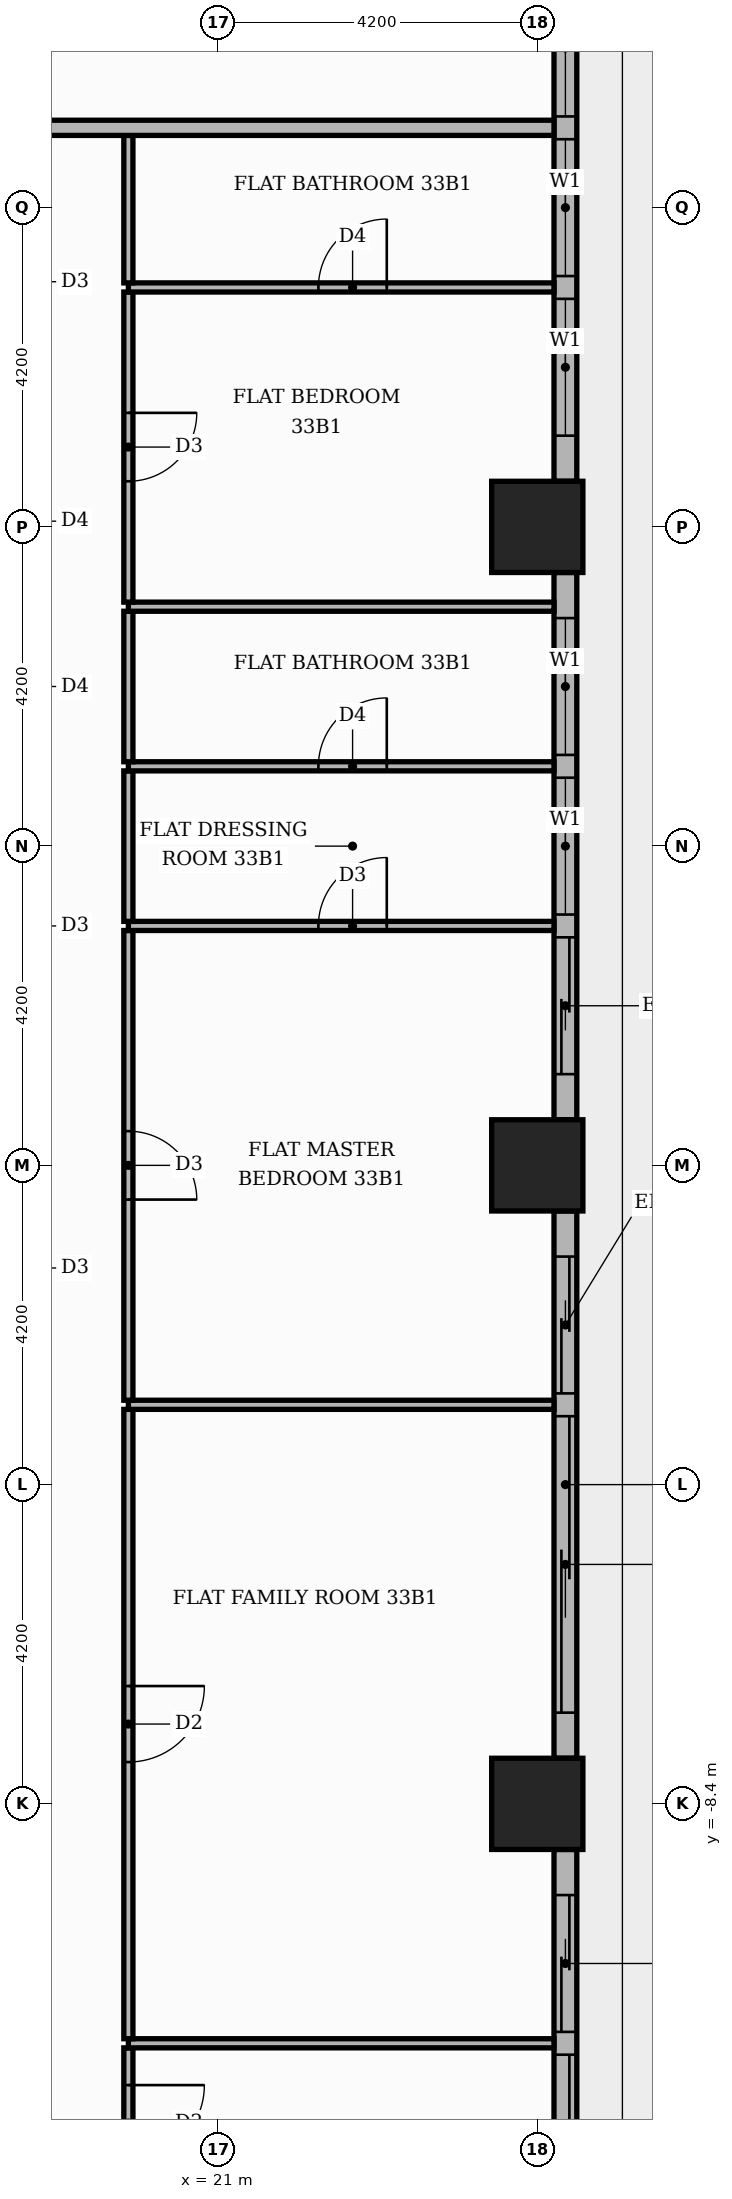
"""IFC4 building model, lengths in metres.
Left out: names, types, materials, properties, quantities, classifications, styles, units other than length and angle.
Written with IfcOpenShell. Run it as: python <this file> out.ifc"""

import sys

from ifc_helpers import new_model, si_unit, direction, frame, frame_2d, origin, origin_2d, place, context, subcontext, project, spatial, rectangle, extrude, element, fill, save


model = new_model("IFC4")
c1 = context("Model", 3, precision=1e-05, world=origin(), true_north=direction((0.0, 1.0)))
c2 = subcontext(c1, "Body", "Model", "MODEL_VIEW")
j1 = project(units=[si_unit("LENGTHUNIT", "METRE"), si_unit("PLANEANGLEUNIT", "RADIAN")], contexts=[c1])
p1 = place(None, origin())
s1 = spatial("IfcSite", under=j1, at=p1, CompositionType="ELEMENT")
p2 = place(p1, origin())
s2 = spatial("IfcBuilding", under=s1, at=p2, CompositionType="ELEMENT")
p3 = place(p2, frame((0.0, 0.0, 141.6)))
s3 = spatial("IfcBuildingStorey", under=s2, at=p3, CompositionType="ELEMENT", Elevation=141.6)
for number, where, z_axis, x_axis in (
    (1, (25.2, 0.0, 0.0), (0.0, 0.0, 1.0), (1.0, 0.0, 0.0)),
    (2, (25.2, 8.4, 0.0), (0.0, 0.0, 1.0), (1.0, 0.0, 0.0)),
    (3, (25.2, -8.4, 0.0), (0.0, 0.0, 1.0), (1.0, 0.0, 0.0)),
):
    element("IfcColumn", number, at=place(p3, frame(where, z_axis=z_axis, x_axis=x_axis)), inside=s3, PredefinedType="COLUMN", context=c2, shape_type="SweptSolid", body=[
        extrude(rectangle(XDim=1.2, YDim=1.2, at=origin_2d()), origin(), (0.0, 0.0, 1.0), 3.9),
    ])
p4 = place(p3, frame((25.57, -16.2, 0.0), z_axis=(0.0, 0.0, 1.0), x_axis=(0.0, 1.0, 0.0)))
e4 = element("IfcWall", 4, at=p4, inside=s3, PredefinedType="STANDARD", context=c2, shape_type="SweptSolid", body=[
    extrude(rectangle(XDim=7.2, YDim=0.3, at=frame_2d((3.6, 0.0))), origin(), (0.0, 0.0, 1.0), 3.48),
])
p5 = place(p4, frame((0.6, 0.0, 0.0)))
e5 = element("IfcOpeningElement", 5, at=p5, cuts=e4, PredefinedType="OPENING", context=c2, shape_type="SweptSolid", body=[
    extrude(rectangle(XDim=3.9, YDim=2.4, at=frame_2d((1.95, 1.2))), frame((0.0, 0.16, 0.0), z_axis=(0.0, -1.0, 0.0), x_axis=(1.0, 0.0, 0.0)), (0.0, 0.0, 1.0), 0.32),
])
p6 = place(p4, frame((4.8, 0.0, 0.0)))
e6 = element("IfcOpeningElement", 6, at=p6, cuts=e4, PredefinedType="OPENING", context=c2, shape_type="SweptSolid", body=[
    extrude(rectangle(XDim=1.8, YDim=2.4, at=frame_2d((0.9, 1.2))), frame((0.0, 0.16, 0.0), z_axis=(0.0, -1.0, 0.0), x_axis=(1.0, 0.0, 0.0)), (0.0, 0.0, 1.0), 0.32),
])
p7 = place(p3, frame((25.57, -7.8, 0.0), z_axis=(0.0, 0.0, 1.0), x_axis=(0.0, 1.0, 0.0)))
e7 = element("IfcWall", 7, at=p7, inside=s3, PredefinedType="STANDARD", context=c2, shape_type="SweptSolid", body=[
    extrude(rectangle(XDim=7.2, YDim=0.3, at=frame_2d((3.6, 0.0))), origin(), (0.0, 0.0, 1.0), 3.48),
])
p8 = place(p7, frame((0.6, 0.0, 0.0)))
e8 = element("IfcOpeningElement", 8, at=p8, cuts=e7, PredefinedType="OPENING", context=c2, shape_type="SweptSolid", body=[
    extrude(rectangle(XDim=3.9, YDim=2.4, at=frame_2d((1.95, 1.2))), frame((0.0, 0.16, 0.0), z_axis=(0.0, -1.0, 0.0), x_axis=(1.0, 0.0, 0.0)), (0.0, 0.0, 1.0), 0.32),
])
p9 = place(p7, frame((4.8, 0.0, 0.0)))
e9 = element("IfcOpeningElement", 9, at=p9, cuts=e7, PredefinedType="OPENING", context=c2, shape_type="SweptSolid", body=[
    extrude(rectangle(XDim=1.8, YDim=2.4, at=frame_2d((0.9, 1.2))), frame((0.0, 0.16, 0.0), z_axis=(0.0, -1.0, 0.0), x_axis=(1.0, 0.0, 0.0)), (0.0, 0.0, 1.0), 0.32),
])
p10 = place(p3, frame((25.57, 0.6, 0.0), z_axis=(0.0, 0.0, 1.0), x_axis=(0.0, 1.0, 0.0)))
e10 = element("IfcWall", 10, at=p10, inside=s3, PredefinedType="STANDARD", context=c2, shape_type="SweptSolid", body=[
    extrude(rectangle(XDim=7.2, YDim=0.3, at=frame_2d((3.6, 0.0))), origin(), (0.0, 0.0, 1.0), 3.48),
])
p11 = place(p10, frame((0.6, 0.0, 0.0)))
e11 = element("IfcOpeningElement", 11, at=p11, cuts=e10, PredefinedType="OPENING", context=c2, shape_type="SweptSolid", body=[
    extrude(rectangle(XDim=1.8, YDim=2.4, at=frame_2d((0.9, 1.2))), frame((0.0, 0.16, 0.0), z_axis=(0.0, -1.0, 0.0), x_axis=(1.0, 0.0, 0.0)), (0.0, 0.0, 1.0), 0.32),
])
p12 = place(p10, frame((2.7, 0.0, 0.9)))
e12 = element("IfcOpeningElement", 12, at=p12, cuts=e10, PredefinedType="OPENING", context=c2, shape_type="SweptSolid", body=[
    extrude(rectangle(XDim=1.8, YDim=2.1, at=frame_2d((0.9, 1.05))), frame((0.0, 0.16, 0.0), z_axis=(0.0, -1.0, 0.0), x_axis=(1.0, 0.0, 0.0)), (0.0, 0.0, 1.0), 0.32),
])
p13 = place(p10, frame((4.8, 0.0, 0.9)))
e13 = element("IfcOpeningElement", 13, at=p13, cuts=e10, PredefinedType="OPENING", context=c2, shape_type="SweptSolid", body=[
    extrude(rectangle(XDim=1.8, YDim=2.1, at=frame_2d((0.9, 1.05))), frame((0.0, 0.16, 0.0), z_axis=(0.0, -1.0, 0.0), x_axis=(1.0, 0.0, 0.0)), (0.0, 0.0, 1.0), 0.32),
])
p14 = place(p3, frame((25.57, 9.0, 0.0), z_axis=(0.0, 0.0, 1.0), x_axis=(0.0, 1.0, 0.0)))
e14 = element("IfcWall", 14, at=p14, inside=s3, PredefinedType="STANDARD", context=c2, shape_type="SweptSolid", body=[
    extrude(rectangle(XDim=7.2, YDim=0.3, at=frame_2d((3.6, 0.0))), origin(), (0.0, 0.0, 1.0), 3.48),
])
p15 = place(p14, frame((0.6, 0.0, 0.9)))
e15 = element("IfcOpeningElement", 15, at=p15, cuts=e14, PredefinedType="OPENING", context=c2, shape_type="SweptSolid", body=[
    extrude(rectangle(XDim=1.8, YDim=2.1, at=frame_2d((0.9, 1.05))), frame((0.0, 0.16, 0.0), z_axis=(0.0, -1.0, 0.0), x_axis=(1.0, 0.0, 0.0)), (0.0, 0.0, 1.0), 0.32),
])
p16 = place(p14, frame((2.7, 0.0, 0.9)))
e16 = element("IfcOpeningElement", 16, at=p16, cuts=e14, PredefinedType="OPENING", context=c2, shape_type="SweptSolid", body=[
    extrude(rectangle(XDim=1.8, YDim=2.1, at=frame_2d((0.9, 1.05))), frame((0.0, 0.16, 0.0), z_axis=(0.0, -1.0, 0.0), x_axis=(1.0, 0.0, 0.0)), (0.0, 0.0, 1.0), 0.32),
])
p17 = place(p14, frame((4.8, 0.0, 0.9)))
e17 = element("IfcOpeningElement", 17, at=p17, cuts=e14, PredefinedType="OPENING", context=c2, shape_type="SweptSolid", body=[
    extrude(rectangle(XDim=1.8, YDim=2.1, at=frame_2d((0.9, 1.05))), frame((0.0, 0.16, 0.0), z_axis=(0.0, -1.0, 0.0), x_axis=(1.0, 0.0, 0.0)), (0.0, 0.0, 1.0), 0.32),
])
p18 = place(p3, frame((19.82, -13.59, 0.0), z_axis=(0.0, 0.0, 1.0), x_axis=(0.0, 1.0, 0.0)))
e18 = element("IfcWall", 18, at=p18, inside=s3, PredefinedType="PARTITIONING", context=c2, shape_type="SweptSolid", body=[
    extrude(rectangle(XDim=1.98, YDim=0.12, at=frame_2d((0.99, 0.0))), origin(), (0.0, 0.0, 1.0), 3.48),
])
p19 = place(p18, frame((0.49, 0.0, 0.0)))
e19 = element("IfcOpeningElement", 19, at=p19, cuts=e18, PredefinedType="OPENING", context=c2, shape_type="SweptSolid", body=[
    extrude(rectangle(XDim=1.0, YDim=2.1, at=frame_2d((0.5, 1.05))), frame((0.0, 0.07, 0.0), z_axis=(0.0, -1.0, 0.0), x_axis=(1.0, 0.0, 0.0)), (0.0, 0.0, 1.0), 0.14),
])
p20 = place(p3, frame((19.82, -11.55, 0.0), z_axis=(0.0, 0.0, 1.0), x_axis=(1.0, 0.0, 0.0)))
e20 = element("IfcWall", 20, at=p20, inside=s3, PredefinedType="PARTITIONING", context=c2, shape_type="SweptSolid", body=[
    extrude(rectangle(XDim=5.6, YDim=0.12, at=frame_2d((2.8, 0.0))), origin(), (0.0, 0.0, 1.0), 3.48),
])
p21 = place(p3, frame((19.82, -11.49, 0.0), z_axis=(0.0, 0.0, 1.0), x_axis=(0.0, 1.0, 0.0)))
e21 = element("IfcWall", 21, at=p21, inside=s3, PredefinedType="PARTITIONING", context=c2, shape_type="SweptSolid", body=[
    extrude(rectangle(XDim=8.28, YDim=0.12, at=frame_2d((4.14, 0.0))), origin(), (0.0, 0.0, 1.0), 3.48),
])
p22 = place(p21, frame((3.64, 0.0, 0.0)))
e22 = element("IfcOpeningElement", 22, at=p22, cuts=e21, PredefinedType="OPENING", context=c2, shape_type="SweptSolid", body=[
    extrude(rectangle(XDim=1.0, YDim=2.1, at=frame_2d((0.5, 1.05))), frame((0.0, 0.07, 0.0), z_axis=(0.0, -1.0, 0.0), x_axis=(1.0, 0.0, 0.0)), (0.0, 0.0, 1.0), 0.14),
])
p23 = place(p3, frame((19.82, -3.15, 0.0), z_axis=(0.0, 0.0, 1.0), x_axis=(1.0, 0.0, 0.0)))
e23 = element("IfcWall", 23, at=p23, inside=s3, PredefinedType="PARTITIONING", context=c2, shape_type="SweptSolid", body=[
    extrude(rectangle(XDim=5.6, YDim=0.12, at=frame_2d((2.8, 0.0))), origin(), (0.0, 0.0, 1.0), 3.48),
])
p24 = place(p3, frame((19.82, -3.09, 0.0), z_axis=(0.0, 0.0, 1.0), x_axis=(0.0, 1.0, 0.0)))
e24 = element("IfcWall", 24, at=p24, inside=s3, PredefinedType="PARTITIONING", context=c2, shape_type="SweptSolid", body=[
    extrude(rectangle(XDim=6.18, YDim=0.12, at=frame_2d((3.09, 0.0))), origin(), (0.0, 0.0, 1.0), 3.48),
])
p25 = place(p24, frame((2.64, 0.0, 0.0)))
e25 = element("IfcOpeningElement", 25, at=p25, cuts=e24, PredefinedType="OPENING", context=c2, shape_type="SweptSolid", body=[
    extrude(rectangle(XDim=0.9, YDim=2.1, at=frame_2d((0.45, 1.05))), frame((0.0, 0.07, 0.0), z_axis=(0.0, -1.0, 0.0), x_axis=(1.0, 0.0, 0.0)), (0.0, 0.0, 1.0), 0.14),
])
p26 = place(p3, frame((19.82, 3.15, 0.0), z_axis=(0.0, 0.0, 1.0), x_axis=(1.0, 0.0, 0.0)))
e26 = element("IfcWall", 26, at=p26, inside=s3, PredefinedType="PARTITIONING", context=c2, shape_type="SweptSolid", body=[
    extrude(rectangle(XDim=5.6, YDim=0.12, at=frame_2d((2.8, 0.0))), origin(), (0.0, 0.0, 1.0), 3.48),
])
p27 = place(p26, frame((2.5, 0.0, 0.0)))
e27 = element("IfcOpeningElement", 27, at=p27, cuts=e26, PredefinedType="OPENING", context=c2, shape_type="SweptSolid", body=[
    extrude(rectangle(XDim=0.9, YDim=2.1, at=frame_2d((0.45, 1.05))), frame((0.0, 0.07, 0.0), z_axis=(0.0, -1.0, 0.0), x_axis=(1.0, 0.0, 0.0)), (0.0, 0.0, 1.0), 0.14),
])
p28 = place(p3, frame((19.82, 3.21, 0.0), z_axis=(0.0, 0.0, 1.0), x_axis=(0.0, 1.0, 0.0)))
e28 = element("IfcWall", 28, at=p28, inside=s3, PredefinedType="PARTITIONING", context=c2, shape_type="SweptSolid", body=[
    extrude(rectangle(XDim=1.98, YDim=0.12, at=frame_2d((0.99, 0.0))), origin(), (0.0, 0.0, 1.0), 3.48),
])
p29 = place(p3, frame((19.82, 5.25, 0.0), z_axis=(0.0, 0.0, 1.0), x_axis=(1.0, 0.0, 0.0)))
e29 = element("IfcWall", 29, at=p29, inside=s3, PredefinedType="PARTITIONING", context=c2, shape_type="SweptSolid", body=[
    extrude(rectangle(XDim=5.6, YDim=0.12, at=frame_2d((2.8, 0.0))), origin(), (0.0, 0.0, 1.0), 3.48),
])
p30 = place(p29, frame((2.5, 0.0, 0.0)))
e30 = element("IfcOpeningElement", 30, at=p30, cuts=e29, PredefinedType="OPENING", context=c2, shape_type="SweptSolid", body=[
    extrude(rectangle(XDim=0.9, YDim=2.1, at=frame_2d((0.45, 1.05))), frame((0.0, 0.07, 0.0), z_axis=(0.0, -1.0, 0.0), x_axis=(1.0, 0.0, 0.0)), (0.0, 0.0, 1.0), 0.14),
])
p31 = place(p3, frame((19.82, 5.31, 0.0), z_axis=(0.0, 0.0, 1.0), x_axis=(0.0, 1.0, 0.0)))
e31 = element("IfcWall", 31, at=p31, inside=s3, PredefinedType="PARTITIONING", context=c2, shape_type="SweptSolid", body=[
    extrude(rectangle(XDim=1.98, YDim=0.12, at=frame_2d((0.99, 0.0))), origin(), (0.0, 0.0, 1.0), 3.48),
])
p32 = place(p3, frame((19.82, 7.35, 0.0), z_axis=(0.0, 0.0, 1.0), x_axis=(1.0, 0.0, 0.0)))
e32 = element("IfcWall", 32, at=p32, inside=s3, PredefinedType="PARTITIONING", context=c2, shape_type="SweptSolid", body=[
    extrude(rectangle(XDim=5.6, YDim=0.12, at=frame_2d((2.8, 0.0))), origin(), (0.0, 0.0, 1.0), 3.48),
])
p33 = place(p3, frame((19.82, 7.41, 0.0), z_axis=(0.0, 0.0, 1.0), x_axis=(0.0, 1.0, 0.0)))
e33 = element("IfcWall", 33, at=p33, inside=s3, PredefinedType="PARTITIONING", context=c2, shape_type="SweptSolid", body=[
    extrude(rectangle(XDim=4.08, YDim=0.12, at=frame_2d((2.04, 0.0))), origin(), (0.0, 0.0, 1.0), 3.48),
])
p34 = place(p33, frame((1.59, 0.0, 0.0)))
e34 = element("IfcOpeningElement", 34, at=p34, cuts=e33, PredefinedType="OPENING", context=c2, shape_type="SweptSolid", body=[
    extrude(rectangle(XDim=0.9, YDim=2.1, at=frame_2d((0.45, 1.05))), frame((0.0, 0.07, 0.0), z_axis=(0.0, -1.0, 0.0), x_axis=(1.0, 0.0, 0.0)), (0.0, 0.0, 1.0), 0.14),
])
p35 = place(p3, frame((19.82, 11.55, 0.0), z_axis=(0.0, 0.0, 1.0), x_axis=(1.0, 0.0, 0.0)))
e35 = element("IfcWall", 35, at=p35, inside=s3, PredefinedType="PARTITIONING", context=c2, shape_type="SweptSolid", body=[
    extrude(rectangle(XDim=5.6, YDim=0.12, at=frame_2d((2.8, 0.0))), origin(), (0.0, 0.0, 1.0), 3.48),
])
p36 = place(p35, frame((2.5, 0.0, 0.0)))
e36 = element("IfcOpeningElement", 36, at=p36, cuts=e35, PredefinedType="OPENING", context=c2, shape_type="SweptSolid", body=[
    extrude(rectangle(XDim=0.9, YDim=2.1, at=frame_2d((0.45, 1.05))), frame((0.0, 0.07, 0.0), z_axis=(0.0, -1.0, 0.0), x_axis=(1.0, 0.0, 0.0)), (0.0, 0.0, 1.0), 0.14),
])
p37 = place(p3, frame((19.82, 11.61, 0.0), z_axis=(0.0, 0.0, 1.0), x_axis=(0.0, 1.0, 0.0)))
e37 = element("IfcWall", 37, at=p37, inside=s3, PredefinedType="PARTITIONING", context=c2, shape_type="SweptSolid", body=[
    extrude(rectangle(XDim=1.94, YDim=0.12, at=frame_2d((0.97, 0.0))), origin(), (0.0, 0.0, 1.0), 3.48),
])
p38 = place(p3, frame((-13.65, 13.65, 0.0), z_axis=(0.0, 0.0, 1.0), x_axis=(1.0, 0.0, 0.0)))
e38 = element("IfcWall", 38, at=p38, inside=s3, PredefinedType="PARTITIONING", context=c2, shape_type="SweptSolid", body=[
    extrude(rectangle(XDim=39.07, YDim=0.2, at=frame_2d((19.535, 0.0))), origin(), (0.0, 0.0, 1.0), 3.48),
])
p39 = place(p38, frame((24.65, 0.0, 0.0)))
e39 = element("IfcOpeningElement", 39, at=p39, cuts=e38, PredefinedType="OPENING", context=c2, shape_type="SweptSolid", body=[
    extrude(rectangle(XDim=1.1, YDim=2.4, at=frame_2d((0.55, 1.2))), frame((0.0, 0.11, 0.0), z_axis=(0.0, -1.0, 0.0), x_axis=(1.0, 0.0, 0.0)), (0.0, 0.0, 1.0), 0.22),
])
p40 = place(p38, frame((12.05, 0.0, 0.0)))
e40 = element("IfcOpeningElement", 40, at=p40, cuts=e38, PredefinedType="OPENING", context=c2, shape_type="SweptSolid", body=[
    extrude(rectangle(XDim=1.1, YDim=2.4, at=frame_2d((0.55, 1.2))), frame((0.0, 0.11, 0.0), z_axis=(0.0, -1.0, 0.0), x_axis=(1.0, 0.0, 0.0)), (0.0, 0.0, 1.0), 0.22),
])
p41 = place(p5, origin())
e41 = element("IfcDoor", 41, at=p41, inside=s3, OperationType="SLIDING_TO_LEFT", PredefinedType="DOOR", context=c2, shape_type="SweptSolid", body=[
    extrude(rectangle(XDim=3.9, YDim=2.4, at=frame_2d((1.95, 1.2))), frame((0.0, 0.025, 0.0), z_axis=(0.0, -1.0, 0.0), x_axis=(1.0, 0.0, 0.0)), (0.0, 0.0, 1.0), 0.05),
])
fill(e5, e41)
p42 = place(p6, origin())
e42 = element("IfcDoor", 42, at=p42, inside=s3, OperationType="SLIDING_TO_RIGHT", PredefinedType="DOOR", context=c2, shape_type="SweptSolid", body=[
    extrude(rectangle(XDim=1.8, YDim=2.4, at=frame_2d((0.9, 1.2))), frame((0.0, 0.025, 0.0), z_axis=(0.0, -1.0, 0.0), x_axis=(1.0, 0.0, 0.0)), (0.0, 0.0, 1.0), 0.05),
])
fill(e6, e42)
p43 = place(p8, origin())
e43 = element("IfcDoor", 43, at=p43, inside=s3, OperationType="SLIDING_TO_LEFT", PredefinedType="DOOR", context=c2, shape_type="SweptSolid", body=[
    extrude(rectangle(XDim=3.9, YDim=2.4, at=frame_2d((1.95, 1.2))), frame((0.0, 0.025, 0.0), z_axis=(0.0, -1.0, 0.0), x_axis=(1.0, 0.0, 0.0)), (0.0, 0.0, 1.0), 0.05),
])
fill(e8, e43)
p44 = place(p9, origin())
e44 = element("IfcDoor", 44, at=p44, inside=s3, OperationType="SLIDING_TO_RIGHT", PredefinedType="DOOR", context=c2, shape_type="SweptSolid", body=[
    extrude(rectangle(XDim=1.8, YDim=2.4, at=frame_2d((0.9, 1.2))), frame((0.0, 0.025, 0.0), z_axis=(0.0, -1.0, 0.0), x_axis=(1.0, 0.0, 0.0)), (0.0, 0.0, 1.0), 0.05),
])
fill(e9, e44)
p45 = place(p11, origin())
e45 = element("IfcDoor", 45, at=p45, inside=s3, OperationType="SLIDING_TO_LEFT", PredefinedType="DOOR", context=c2, shape_type="SweptSolid", body=[
    extrude(rectangle(XDim=1.8, YDim=2.4, at=frame_2d((0.9, 1.2))), frame((0.0, 0.025, 0.0), z_axis=(0.0, -1.0, 0.0), x_axis=(1.0, 0.0, 0.0)), (0.0, 0.0, 1.0), 0.05),
])
fill(e11, e45)
p46 = place(p12, origin())
e46 = element("IfcWindow", 46, at=p46, inside=s3, PartitioningType="SINGLE_PANEL", PredefinedType="WINDOW", context=c2, shape_type="SweptSolid", body=[
    extrude(rectangle(XDim=1.8, YDim=2.1, at=frame_2d((0.9, 1.05))), frame((0.0, 0.03, 0.0), z_axis=(0.0, -1.0, 0.0), x_axis=(1.0, 0.0, 0.0)), (0.0, 0.0, 1.0), 0.06),
])
fill(e12, e46)
p47 = place(p13, origin())
e47 = element("IfcWindow", 47, at=p47, inside=s3, PartitioningType="SINGLE_PANEL", PredefinedType="WINDOW", context=c2, shape_type="SweptSolid", body=[
    extrude(rectangle(XDim=1.8, YDim=2.1, at=frame_2d((0.9, 1.05))), frame((0.0, 0.03, 0.0), z_axis=(0.0, -1.0, 0.0), x_axis=(1.0, 0.0, 0.0)), (0.0, 0.0, 1.0), 0.06),
])
fill(e13, e47)
p48 = place(p15, origin())
e48 = element("IfcWindow", 48, at=p48, inside=s3, PartitioningType="SINGLE_PANEL", PredefinedType="WINDOW", context=c2, shape_type="SweptSolid", body=[
    extrude(rectangle(XDim=1.8, YDim=2.1, at=frame_2d((0.9, 1.05))), frame((0.0, 0.03, 0.0), z_axis=(0.0, -1.0, 0.0), x_axis=(1.0, 0.0, 0.0)), (0.0, 0.0, 1.0), 0.06),
])
fill(e15, e48)
p49 = place(p16, origin())
e49 = element("IfcWindow", 49, at=p49, inside=s3, PartitioningType="SINGLE_PANEL", PredefinedType="WINDOW", context=c2, shape_type="SweptSolid", body=[
    extrude(rectangle(XDim=1.8, YDim=2.1, at=frame_2d((0.9, 1.05))), frame((0.0, 0.03, 0.0), z_axis=(0.0, -1.0, 0.0), x_axis=(1.0, 0.0, 0.0)), (0.0, 0.0, 1.0), 0.06),
])
fill(e16, e49)
p50 = place(p17, origin())
e50 = element("IfcWindow", 50, at=p50, inside=s3, PartitioningType="SINGLE_PANEL", PredefinedType="WINDOW", context=c2, shape_type="SweptSolid", body=[
    extrude(rectangle(XDim=1.8, YDim=2.1, at=frame_2d((0.9, 1.05))), frame((0.0, 0.03, 0.0), z_axis=(0.0, -1.0, 0.0), x_axis=(1.0, 0.0, 0.0)), (0.0, 0.0, 1.0), 0.06),
])
fill(e17, e50)
p51 = place(p19, frame((1.0, 0.0, 0.0), z_axis=(0.0, 0.0, 1.0), x_axis=(-1.0, 0.0, 0.0)))
e51 = element("IfcDoor", 51, at=p51, inside=s3, OperationType="SINGLE_SWING_RIGHT", PredefinedType="DOOR", context=c2, shape_type="SweptSolid", body=[
    extrude(rectangle(XDim=1.0, YDim=2.1, at=frame_2d((0.5, 1.05))), frame((0.0, 0.025, 0.0), z_axis=(0.0, -1.0, 0.0), x_axis=(1.0, 0.0, 0.0)), (0.0, 0.0, 1.0), 0.05),
])
fill(e19, e51)
p52 = place(p22, frame((1.0, 0.0, 0.0), z_axis=(0.0, 0.0, 1.0), x_axis=(-1.0, 0.0, 0.0)))
e52 = element("IfcDoor", 52, at=p52, inside=s3, OperationType="SINGLE_SWING_RIGHT", PredefinedType="DOOR", context=c2, shape_type="SweptSolid", body=[
    extrude(rectangle(XDim=1.0, YDim=2.1, at=frame_2d((0.5, 1.05))), frame((0.0, 0.025, 0.0), z_axis=(0.0, -1.0, 0.0), x_axis=(1.0, 0.0, 0.0)), (0.0, 0.0, 1.0), 0.05),
])
fill(e22, e52)
p53 = place(p25, frame((0.9, 0.0, 0.0), z_axis=(0.0, 0.0, 1.0), x_axis=(-1.0, 0.0, 0.0)))
e53 = element("IfcDoor", 53, at=p53, inside=s3, OperationType="SINGLE_SWING_LEFT", PredefinedType="DOOR", context=c2, shape_type="SweptSolid", body=[
    extrude(rectangle(XDim=0.9, YDim=2.1, at=frame_2d((0.45, 1.05))), frame((0.0, 0.025, 0.0), z_axis=(0.0, -1.0, 0.0), x_axis=(1.0, 0.0, 0.0)), (0.0, 0.0, 1.0), 0.05),
])
fill(e25, e53)
p54 = place(p27, origin())
e54 = element("IfcDoor", 54, at=p54, inside=s3, OperationType="SINGLE_SWING_RIGHT", PredefinedType="DOOR", context=c2, shape_type="SweptSolid", body=[
    extrude(rectangle(XDim=0.9, YDim=2.1, at=frame_2d((0.45, 1.05))), frame((0.0, 0.025, 0.0), z_axis=(0.0, -1.0, 0.0), x_axis=(1.0, 0.0, 0.0)), (0.0, 0.0, 1.0), 0.05),
])
fill(e27, e54)
p55 = place(p30, origin())
e55 = element("IfcDoor", 55, at=p55, inside=s3, OperationType="SINGLE_SWING_RIGHT", PredefinedType="DOOR", context=c2, shape_type="SweptSolid", body=[
    extrude(rectangle(XDim=0.9, YDim=2.1, at=frame_2d((0.45, 1.05))), frame((0.0, 0.025, 0.0), z_axis=(0.0, -1.0, 0.0), x_axis=(1.0, 0.0, 0.0)), (0.0, 0.0, 1.0), 0.05),
])
fill(e30, e55)
p56 = place(p34, frame((0.9, 0.0, 0.0), z_axis=(0.0, 0.0, 1.0), x_axis=(-1.0, 0.0, 0.0)))
e56 = element("IfcDoor", 56, at=p56, inside=s3, OperationType="SINGLE_SWING_RIGHT", PredefinedType="DOOR", context=c2, shape_type="SweptSolid", body=[
    extrude(rectangle(XDim=0.9, YDim=2.1, at=frame_2d((0.45, 1.05))), frame((0.0, 0.025, 0.0), z_axis=(0.0, -1.0, 0.0), x_axis=(1.0, 0.0, 0.0)), (0.0, 0.0, 1.0), 0.05),
])
fill(e34, e56)
p57 = place(p36, origin())
e57 = element("IfcDoor", 57, at=p57, inside=s3, OperationType="SINGLE_SWING_RIGHT", PredefinedType="DOOR", context=c2, shape_type="SweptSolid", body=[
    extrude(rectangle(XDim=0.9, YDim=2.1, at=frame_2d((0.45, 1.05))), frame((0.0, 0.025, 0.0), z_axis=(0.0, -1.0, 0.0), x_axis=(1.0, 0.0, 0.0)), (0.0, 0.0, 1.0), 0.05),
])
fill(e36, e57)
save(model, sys.argv[1])
